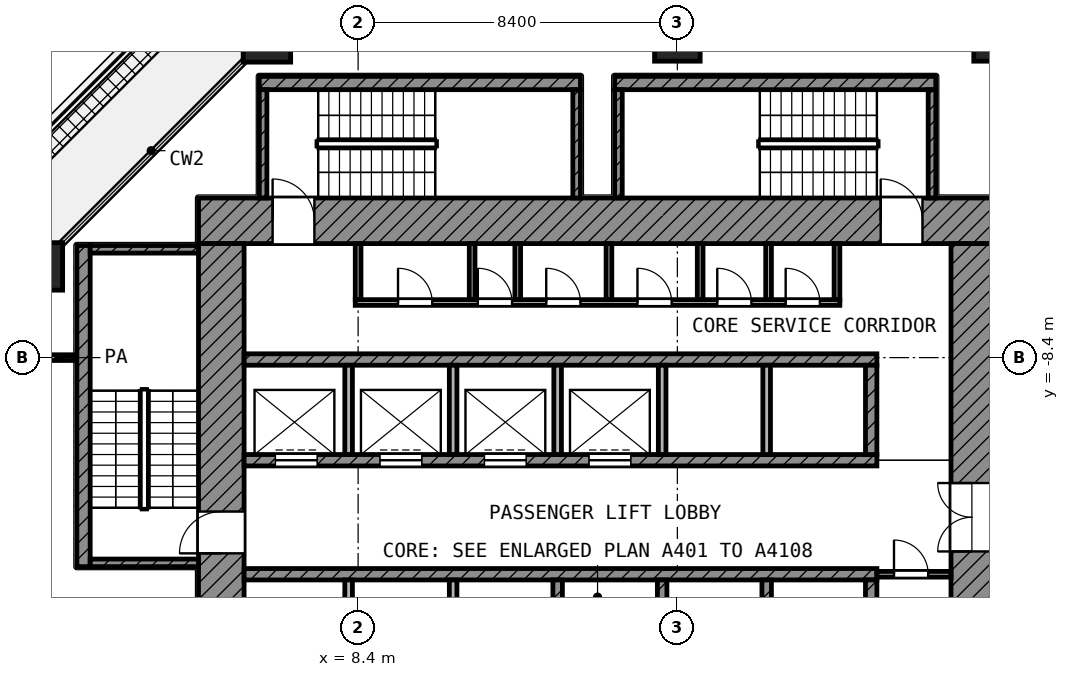
"""IFC4 building model, lengths in metres.
Left out: names, types, materials, properties, quantities, classifications, styles, units other than length and angle.
Written with IfcOpenShell. Run it as: python <this file> out.ifc"""

import sys

from ifc_helpers import new_model, si_unit, direction, frame, frame_2d, origin, origin_2d, place, context, subcontext, project, spatial, rectangle, extrude, element, fill, save


model = new_model("IFC4")
c1 = context("Model", 3, precision=1e-05, world=origin(), true_north=direction((0.0, 1.0)))
c2 = subcontext(c1, "Body", "Model", "MODEL_VIEW")
j1 = project(units=[si_unit("LENGTHUNIT", "METRE"), si_unit("PLANEANGLEUNIT", "RADIAN")], contexts=[c1])
p1 = place(None, origin())
s1 = spatial("IfcSite", under=j1, at=p1, CompositionType="ELEMENT")
p2 = place(p1, origin())
s2 = spatial("IfcBuilding", under=s1, at=p2, CompositionType="ELEMENT")
p3 = place(p2, frame((0.0, 0.0, 68.6)))
s3 = spatial("IfcBuildingStorey", under=s2, at=p3, CompositionType="ELEMENT", Elevation=68.6)
p4 = place(p3, frame((6.0, 0.0, 0.0), z_axis=(0.0, 0.0, 1.0), x_axis=(1.0, 0.0, 0.0)))
e1 = element("IfcColumn", 1, at=p4, inside=s3, PredefinedType="COLUMN", context=c2, shape_type="SweptSolid", body=[
    extrude(rectangle(XDim=1.25, YDim=1.25, at=origin_2d()), origin(), (0.0, 0.0, 1.0), 4.2),
])
for number, where, z_axis, x_axis in (
    (2, (16.8, 0.0, 0.0), (0.0, 0.0, 1.0), (1.0, 0.0, 0.0)),
    (3, (25.2, 0.0, 0.0), (0.0, 0.0, 1.0), (1.0, 0.0, 0.0)),
):
    element("IfcColumn", number, at=place(p3, frame(where, z_axis=z_axis, x_axis=x_axis)), inside=s3, PredefinedType="COLUMN", context=c2, shape_type="SweptSolid", body=[
        extrude(rectangle(XDim=1.2, YDim=1.2, at=origin_2d()), origin(), (0.0, 0.0, 1.0), 4.2),
    ])
p5 = place(p3, frame((0.0, -6.0, 0.0), z_axis=(0.0, 0.0, 1.0), x_axis=(1.0, 0.0, 0.0)))
e4 = element("IfcColumn", 4, at=p5, inside=s3, PredefinedType="COLUMN", context=c2, shape_type="SweptSolid", body=[
    extrude(rectangle(XDim=1.25, YDim=1.25, at=origin_2d()), origin(), (0.0, 0.0, 1.0), 4.2),
])
p6 = place(p3, frame((4.2, -4.8, 0.0), z_axis=(0.0, 0.0, 1.0), x_axis=(1.0, 0.0, 0.0)))
e5 = element("IfcWall", 5, at=p6, inside=s3, PredefinedType="SHEAR", context=c2, shape_type="SweptSolid", body=[
    extrude(rectangle(XDim=20.9, YDim=1.2, at=frame_2d((10.45, 0.0))), origin(), (0.0, 0.0, 1.0), 3.9),
])
p7 = place(p6, frame((1.95, 0.0, 0.0)))
e6 = element("IfcOpeningElement", 6, at=p7, cuts=e5, PredefinedType="OPENING", context=c2, shape_type="SweptSolid", body=[
    extrude(rectangle(XDim=1.1, YDim=2.1, at=frame_2d((0.55, 1.05))), frame((0.0, 0.61, 0.0), z_axis=(0.0, -1.0, 0.0), x_axis=(1.0, 0.0, 0.0)), (0.0, 0.0, 1.0), 1.22),
])
p8 = place(p6, frame((17.95, 0.0, 0.0)))
e7 = element("IfcOpeningElement", 7, at=p8, cuts=e5, PredefinedType="OPENING", context=c2, shape_type="SweptSolid", body=[
    extrude(rectangle(XDim=1.1, YDim=2.1, at=frame_2d((0.55, 1.05))), frame((0.0, 0.61, 0.0), z_axis=(0.0, -1.0, 0.0), x_axis=(1.0, 0.0, 0.0)), (0.0, 0.0, 1.0), 1.22),
])
p9 = place(p3, frame((4.8, -25.1, 0.0), z_axis=(0.0, 0.0, 1.0), x_axis=(0.0, 1.0, 0.0)))
e8 = element("IfcWall", 8, at=p9, inside=s3, PredefinedType="SHEAR", context=c2, shape_type="SweptSolid", body=[
    extrude(rectangle(XDim=19.7, YDim=1.2, at=frame_2d((9.85, 0.0))), origin(), (0.0, 0.0, 1.0), 3.9),
])
p10 = place(p9, frame((11.55, 0.0, 0.0)))
e9 = element("IfcOpeningElement", 9, at=p10, cuts=e8, PredefinedType="OPENING", context=c2, shape_type="SweptSolid", body=[
    extrude(rectangle(XDim=1.1, YDim=2.1, at=frame_2d((0.55, 1.05))), frame((0.0, 0.61, 0.0), z_axis=(0.0, -1.0, 0.0), x_axis=(1.0, 0.0, 0.0)), (0.0, 0.0, 1.0), 1.22),
])
p11 = place(p9, frame((2.25, 0.0, 0.0)))
e10 = element("IfcOpeningElement", 10, at=p11, cuts=e8, PredefinedType="OPENING", context=c2, shape_type="SweptSolid", body=[
    extrude(rectangle(XDim=1.1, YDim=2.1, at=frame_2d((0.55, 1.05))), frame((0.0, 0.61, 0.0), z_axis=(0.0, -1.0, 0.0), x_axis=(1.0, 0.0, 0.0)), (0.0, 0.0, 1.0), 1.22),
])
p12 = place(p3, frame((24.55, -24.0, 0.0), z_axis=(0.0, 0.0, 1.0), x_axis=(0.0, 1.0, 0.0)))
e11 = element("IfcWall", 11, at=p12, inside=s3, PredefinedType="SHEAR", context=c2, shape_type="SweptSolid", body=[
    extrude(rectangle(XDim=18.6, YDim=1.1, at=frame_2d((9.3, 0.0))), origin(), (0.0, 0.0, 1.0), 3.9),
])
p13 = place(p12, frame((10.5, 0.0, 0.0)))
e12 = element("IfcOpeningElement", 12, at=p13, cuts=e11, PredefinedType="OPENING", context=c2, shape_type="SweptSolid", body=[
    extrude(rectangle(XDim=1.8, YDim=2.1, at=frame_2d((0.9, 1.05))), frame((0.0, 0.56, 0.0), z_axis=(0.0, -1.0, 0.0), x_axis=(1.0, 0.0, 0.0)), (0.0, 0.0, 1.0), 1.12),
])
p14 = place(p3, frame((5.4, -8.45, 0.0), z_axis=(0.0, 0.0, 1.0), x_axis=(1.0, 0.0, 0.0)))
e13 = element("IfcWall", 13, at=p14, inside=s3, PredefinedType="SHEAR", context=c2, shape_type="SweptSolid", body=[
    extrude(rectangle(XDim=16.65, YDim=0.3, at=frame_2d((8.325, 0.0))), origin(), (0.0, 0.0, 1.0), 3.9),
])
p15 = place(p3, frame((5.4, -11.1, 0.0), z_axis=(0.0, 0.0, 1.0), x_axis=(1.0, 0.0, 0.0)))
e14 = element("IfcWall", 14, at=p15, inside=s3, PredefinedType="SHEAR", context=c2, shape_type="SweptSolid", body=[
    extrude(rectangle(XDim=16.65, YDim=0.3, at=frame_2d((8.325, 0.0))), origin(), (0.0, 0.0, 1.0), 3.9),
])
p16 = place(p15, frame((0.825, 0.0, 0.0)))
e15 = element("IfcOpeningElement", 15, at=p16, cuts=e14, PredefinedType="OPENING", context=c2, shape_type="SweptSolid", body=[
    extrude(rectangle(XDim=1.1, YDim=2.1, at=frame_2d((0.55, 1.05))), frame((0.0, 0.16, 0.0), z_axis=(0.0, -1.0, 0.0), x_axis=(1.0, 0.0, 0.0)), (0.0, 0.0, 1.0), 0.32),
])
p17 = place(p15, frame((3.575, 0.0, 0.0)))
e16 = element("IfcOpeningElement", 16, at=p17, cuts=e14, PredefinedType="OPENING", context=c2, shape_type="SweptSolid", body=[
    extrude(rectangle(XDim=1.1, YDim=2.1, at=frame_2d((0.55, 1.05))), frame((0.0, 0.16, 0.0), z_axis=(0.0, -1.0, 0.0), x_axis=(1.0, 0.0, 0.0)), (0.0, 0.0, 1.0), 0.32),
])
p18 = place(p15, frame((6.325, 0.0, 0.0)))
e17 = element("IfcOpeningElement", 17, at=p18, cuts=e14, PredefinedType="OPENING", context=c2, shape_type="SweptSolid", body=[
    extrude(rectangle(XDim=1.1, YDim=2.1, at=frame_2d((0.55, 1.05))), frame((0.0, 0.16, 0.0), z_axis=(0.0, -1.0, 0.0), x_axis=(1.0, 0.0, 0.0)), (0.0, 0.0, 1.0), 0.32),
])
p19 = place(p15, frame((9.075, 0.0, 0.0)))
e18 = element("IfcOpeningElement", 18, at=p19, cuts=e14, PredefinedType="OPENING", context=c2, shape_type="SweptSolid", body=[
    extrude(rectangle(XDim=1.1, YDim=2.1, at=frame_2d((0.55, 1.05))), frame((0.0, 0.16, 0.0), z_axis=(0.0, -1.0, 0.0), x_axis=(1.0, 0.0, 0.0)), (0.0, 0.0, 1.0), 0.32),
])
p20 = place(p3, frame((5.4, -14.1, 0.0), z_axis=(0.0, 0.0, 1.0), x_axis=(1.0, 0.0, 0.0)))
e19 = element("IfcWall", 19, at=p20, inside=s3, PredefinedType="SHEAR", context=c2, shape_type="SweptSolid", body=[
    extrude(rectangle(XDim=16.65, YDim=0.3, at=frame_2d((8.325, 0.0))), origin(), (0.0, 0.0, 1.0), 3.9),
])
p21 = place(p3, frame((21.9, -10.95, 0.0), z_axis=(0.0, 0.0, 1.0), x_axis=(0.0, 1.0, 0.0)))
e20 = element("IfcWall", 20, at=p21, inside=s3, PredefinedType="SHEAR", context=c2, shape_type="SweptSolid", body=[
    extrude(rectangle(XDim=2.35, YDim=0.3, at=frame_2d((1.175, 0.0))), origin(), (0.0, 0.0, 1.0), 3.9),
])
p22 = place(p3, frame((21.9, -16.6, 0.0), z_axis=(0.0, 0.0, 1.0), x_axis=(0.0, 1.0, 0.0)))
e21 = element("IfcWall", 21, at=p22, inside=s3, PredefinedType="SHEAR", context=c2, shape_type="SweptSolid", body=[
    extrude(rectangle(XDim=2.35, YDim=0.3, at=frame_2d((1.175, 0.0))), origin(), (0.0, 0.0, 1.0), 3.9),
])
for number, where, z_axis, x_axis in (
    (22, (8.15, -10.95, 0.0), (0.0, 0.0, 1.0), (0.0, 1.0, 0.0)),
    (23, (10.9, -10.95, 0.0), (0.0, 0.0, 1.0), (0.0, 1.0, 0.0)),
    (24, (13.65, -10.95, 0.0), (0.0, 0.0, 1.0), (0.0, 1.0, 0.0)),
    (25, (16.4, -10.95, 0.0), (0.0, 0.0, 1.0), (0.0, 1.0, 0.0)),
    (26, (19.15, -10.95, 0.0), (0.0, 0.0, 1.0), (0.0, 1.0, 0.0)),
):
    element("IfcWall", number, at=place(p3, frame(where, z_axis=z_axis, x_axis=x_axis)), inside=s3, PredefinedType="PARTITIONING", context=c2, shape_type="SweptSolid", body=[
        extrude(rectangle(XDim=2.35, YDim=0.2, at=frame_2d((1.175, 0.0))), origin(), (0.0, 0.0, 1.0), 3.9),
    ])
for number, where, z_axis, x_axis in (
    (27, (8.15, -16.6, 0.0), (0.0, 0.0, 1.0), (0.0, 1.0, 0.0)),
    (28, (10.9, -16.6, 0.0), (0.0, 0.0, 1.0), (0.0, 1.0, 0.0)),
):
    element("IfcWall", number, at=place(p3, frame(where, z_axis=z_axis, x_axis=x_axis)), inside=s3, PredefinedType="PARTITIONING", context=c2, shape_type="SweptSolid", body=[
        extrude(rectangle(XDim=2.35, YDim=0.2, at=frame_2d((1.175, 0.0))), origin(), (0.0, 0.0, 1.0), 3.9),
    ])
for number, where, z_axis, x_axis in (
    (29, (13.65, -16.6, 0.0), (0.0, 0.0, 1.0), (0.0, 1.0, 0.0)),
    (30, (16.4, -16.6, 0.0), (0.0, 0.0, 1.0), (0.0, 1.0, 0.0)),
    (31, (19.15, -16.6, 0.0), (0.0, 0.0, 1.0), (0.0, 1.0, 0.0)),
):
    element("IfcWall", number, at=place(p3, frame(where, z_axis=z_axis, x_axis=x_axis)), inside=s3, PredefinedType="SHEAR", context=c2, shape_type="SweptSolid", body=[
        extrude(rectangle(XDim=2.35, YDim=0.25, at=frame_2d((1.175, 0.0))), origin(), (0.0, 0.0, 1.0), 3.9),
    ])
p23 = place(p3, frame((22.05, -14.1, 0.0), z_axis=(0.0, 0.0, 1.0), x_axis=(1.0, 0.0, 0.0)))
e32 = element("IfcWall", 32, at=p23, inside=s3, PredefinedType="PARTITIONING", context=c2, shape_type="SweptSolid", body=[
    extrude(rectangle(XDim=1.95, YDim=0.15, at=frame_2d((0.975, 0.0))), origin(), (0.0, 0.0, 1.0), 3.9),
])
p24 = place(p23, frame((0.45, 0.0, 0.0)))
e33 = element("IfcOpeningElement", 33, at=p24, cuts=e32, PredefinedType="OPENING", context=c2, shape_type="SweptSolid", body=[
    extrude(rectangle(XDim=0.9, YDim=2.1, at=frame_2d((0.45, 1.05))), frame((0.0, 0.085, 0.0), z_axis=(0.0, -1.0, 0.0), x_axis=(1.0, 0.0, 0.0)), (0.0, 0.0, 1.0), 0.17),
])
p25 = place(p3, frame((8.325, -6.95, 0.0), z_axis=(0.0, 0.0, 1.0), x_axis=(1.0, 0.0, 0.0)))
e34 = element("IfcWall", 34, at=p25, inside=s3, PredefinedType="PARTITIONING", context=c2, shape_type="SweptSolid", body=[
    extrude(rectangle(XDim=12.75, YDim=0.15, at=frame_2d((6.375, 0.0))), origin(), (0.0, 0.0, 1.0), 3.9),
])
p26 = place(p25, frame((1.125, 0.0, 0.0)))
e35 = element("IfcOpeningElement", 35, at=p26, cuts=e34, PredefinedType="OPENING", context=c2, shape_type="SweptSolid", body=[
    extrude(rectangle(XDim=0.9, YDim=2.1, at=frame_2d((0.45, 1.05))), frame((0.0, 0.085, 0.0), z_axis=(0.0, -1.0, 0.0), x_axis=(1.0, 0.0, 0.0)), (0.0, 0.0, 1.0), 0.17),
])
p27 = place(p25, frame((3.225, 0.0, 0.0)))
e36 = element("IfcOpeningElement", 36, at=p27, cuts=e34, PredefinedType="OPENING", context=c2, shape_type="SweptSolid", body=[
    extrude(rectangle(XDim=0.9, YDim=2.1, at=frame_2d((0.45, 1.05))), frame((0.0, 0.085, 0.0), z_axis=(0.0, -1.0, 0.0), x_axis=(1.0, 0.0, 0.0)), (0.0, 0.0, 1.0), 0.17),
])
p28 = place(p25, frame((5.025, 0.0, 0.0)))
e37 = element("IfcOpeningElement", 37, at=p28, cuts=e34, PredefinedType="OPENING", context=c2, shape_type="SweptSolid", body=[
    extrude(rectangle(XDim=0.9, YDim=2.1, at=frame_2d((0.45, 1.05))), frame((0.0, 0.085, 0.0), z_axis=(0.0, -1.0, 0.0), x_axis=(1.0, 0.0, 0.0)), (0.0, 0.0, 1.0), 0.17),
])
p29 = place(p25, frame((7.425, 0.0, 0.0)))
e38 = element("IfcOpeningElement", 38, at=p29, cuts=e34, PredefinedType="OPENING", context=c2, shape_type="SweptSolid", body=[
    extrude(rectangle(XDim=0.9, YDim=2.1, at=frame_2d((0.45, 1.05))), frame((0.0, 0.085, 0.0), z_axis=(0.0, -1.0, 0.0), x_axis=(1.0, 0.0, 0.0)), (0.0, 0.0, 1.0), 0.17),
])
p30 = place(p25, frame((9.525, 0.0, 0.0)))
e39 = element("IfcOpeningElement", 39, at=p30, cuts=e34, PredefinedType="OPENING", context=c2, shape_type="SweptSolid", body=[
    extrude(rectangle(XDim=0.9, YDim=2.1, at=frame_2d((0.45, 1.05))), frame((0.0, 0.085, 0.0), z_axis=(0.0, -1.0, 0.0), x_axis=(1.0, 0.0, 0.0)), (0.0, 0.0, 1.0), 0.17),
])
p31 = place(p25, frame((11.325, 0.0, 0.0)))
e40 = element("IfcOpeningElement", 40, at=p31, cuts=e34, PredefinedType="OPENING", context=c2, shape_type="SweptSolid", body=[
    extrude(rectangle(XDim=0.9, YDim=2.1, at=frame_2d((0.45, 1.05))), frame((0.0, 0.085, 0.0), z_axis=(0.0, -1.0, 0.0), x_axis=(1.0, 0.0, 0.0)), (0.0, 0.0, 1.0), 0.17),
])
for number, where, z_axis, x_axis in (
    (41, (8.4, -6.875, 0.0), (0.0, 0.0, 1.0), (0.0, 1.0, 0.0)),
    (42, (11.4, -6.875, 0.0), (0.0, 0.0, 1.0), (0.0, 1.0, 0.0)),
    (43, (12.6, -6.875, 0.0), (0.0, 0.0, 1.0), (0.0, 1.0, 0.0)),
    (44, (15.0, -6.875, 0.0), (0.0, 0.0, 1.0), (0.0, 1.0, 0.0)),
    (45, (17.4, -6.875, 0.0), (0.0, 0.0, 1.0), (0.0, 1.0, 0.0)),
    (46, (19.2, -6.875, 0.0), (0.0, 0.0, 1.0), (0.0, 1.0, 0.0)),
    (47, (21.0, -6.875, 0.0), (0.0, 0.0, 1.0), (0.0, 1.0, 0.0)),
):
    element("IfcWall", number, at=place(p3, frame(where, z_axis=z_axis, x_axis=x_axis)), inside=s3, PredefinedType="PARTITIONING", context=c2, shape_type="SweptSolid", body=[
        extrude(rectangle(XDim=1.475, YDim=0.15, at=frame_2d((0.738, 0.0))), origin(), (0.0, 0.0, 1.0), 3.9),
    ])
p32 = place(p3, frame((1.175, -13.9, 0.0), z_axis=(0.0, 0.0, 1.0), x_axis=(0.0, 1.0, 0.0)))
e48 = element("IfcWall", 48, at=p32, inside=s3, PredefinedType="SHEAR", context=c2, shape_type="SweptSolid", body=[
    extrude(rectangle(XDim=8.45, YDim=0.35, at=frame_2d((4.225, 0.0))), origin(), (0.0, 0.0, 1.0), 3.9),
])
for number, where, z_axis, x_axis in (
    (49, (1.35, -5.55, 0.0), (0.0, 0.0, 1.0), (1.0, 0.0, 0.0)),
    (50, (1.35, -13.8, 0.0), (0.0, 0.0, 1.0), (1.0, 0.0, 0.0)),
):
    element("IfcWall", number, at=place(p3, frame(where, z_axis=z_axis, x_axis=x_axis)), inside=s3, PredefinedType="SHEAR", context=c2, shape_type="SweptSolid", body=[
        extrude(rectangle(XDim=2.85, YDim=0.2, at=frame_2d((1.425, 0.0))), origin(), (0.0, 0.0, 1.0), 3.9),
    ])
p33 = place(p3, frame((5.8, -1.175, 0.0), z_axis=(0.0, 0.0, 1.0), x_axis=(1.0, 0.0, 0.0)))
e51 = element("IfcWall", 51, at=p33, inside=s3, PredefinedType="SHEAR", context=c2, shape_type="SweptSolid", body=[
    extrude(rectangle(XDim=8.45, YDim=0.35, at=frame_2d((4.225, 0.0))), origin(), (0.0, 0.0, 1.0), 3.9),
])
for number, where, z_axis, x_axis in (
    (52, (5.9, -4.2, 0.0), (0.0, 0.0, 1.0), (0.0, 1.0, 0.0)),
    (53, (14.15, -4.2, 0.0), (0.0, 0.0, 1.0), (0.0, 1.0, 0.0)),
):
    element("IfcWall", number, at=place(p3, frame(where, z_axis=z_axis, x_axis=x_axis)), inside=s3, PredefinedType="SHEAR", context=c2, shape_type="SweptSolid", body=[
        extrude(rectangle(XDim=2.85, YDim=0.2, at=frame_2d((1.425, 0.0))), origin(), (0.0, 0.0, 1.0), 3.9),
    ])
p34 = place(p3, frame((15.15, -1.175, 0.0), z_axis=(0.0, 0.0, 1.0), x_axis=(1.0, 0.0, 0.0)))
e54 = element("IfcWall", 54, at=p34, inside=s3, PredefinedType="SHEAR", context=c2, shape_type="SweptSolid", body=[
    extrude(rectangle(XDim=8.45, YDim=0.35, at=frame_2d((4.225, 0.0))), origin(), (0.0, 0.0, 1.0), 3.9),
])
for number, where, z_axis, x_axis in (
    (55, (15.25, -4.2, 0.0), (0.0, 0.0, 1.0), (0.0, 1.0, 0.0)),
    (56, (23.5, -4.2, 0.0), (0.0, 0.0, 1.0), (0.0, 1.0, 0.0)),
):
    element("IfcWall", number, at=place(p3, frame(where, z_axis=z_axis, x_axis=x_axis)), inside=s3, PredefinedType="SHEAR", context=c2, shape_type="SweptSolid", body=[
        extrude(rectangle(XDim=2.85, YDim=0.2, at=frame_2d((1.425, 0.0))), origin(), (0.0, 0.0, 1.0), 3.9),
    ])
p35 = place(p3, frame((0.08, -8.4, 0.0), z_axis=(0.0, 0.0, 1.0), x_axis=(1.0, 0.0, 0.0)))
e57 = element("IfcWall", 57, at=p35, inside=s3, PredefinedType="PARTITIONING", context=c2, shape_type="SweptSolid", body=[
    extrude(rectangle(XDim=0.89, YDim=0.15, at=frame_2d((0.445, 0.0))), origin(), (0.0, 0.0, 1.0), 3.9),
])
p36 = place(p16, origin())
e58 = element("IfcDoor", 58, at=p36, inside=s3, OperationType="DOUBLE_DOOR_SLIDING", PredefinedType="DOOR", context=c2, shape_type="SweptSolid", body=[
    extrude(rectangle(XDim=1.1, YDim=2.1, at=frame_2d((0.55, 1.05))), frame((0.0, 0.025, 0.0), z_axis=(0.0, -1.0, 0.0), x_axis=(1.0, 0.0, 0.0)), (0.0, 0.0, 1.0), 0.05),
])
fill(e15, e58)
p37 = place(p17, origin())
e59 = element("IfcDoor", 59, at=p37, inside=s3, OperationType="DOUBLE_DOOR_SLIDING", PredefinedType="DOOR", context=c2, shape_type="SweptSolid", body=[
    extrude(rectangle(XDim=1.1, YDim=2.1, at=frame_2d((0.55, 1.05))), frame((0.0, 0.025, 0.0), z_axis=(0.0, -1.0, 0.0), x_axis=(1.0, 0.0, 0.0)), (0.0, 0.0, 1.0), 0.05),
])
fill(e16, e59)
p38 = place(p18, origin())
e60 = element("IfcDoor", 60, at=p38, inside=s3, OperationType="DOUBLE_DOOR_SLIDING", PredefinedType="DOOR", context=c2, shape_type="SweptSolid", body=[
    extrude(rectangle(XDim=1.1, YDim=2.1, at=frame_2d((0.55, 1.05))), frame((0.0, 0.025, 0.0), z_axis=(0.0, -1.0, 0.0), x_axis=(1.0, 0.0, 0.0)), (0.0, 0.0, 1.0), 0.05),
])
fill(e17, e60)
p39 = place(p19, origin())
e61 = element("IfcDoor", 61, at=p39, inside=s3, OperationType="DOUBLE_DOOR_SLIDING", PredefinedType="DOOR", context=c2, shape_type="SweptSolid", body=[
    extrude(rectangle(XDim=1.1, YDim=2.1, at=frame_2d((0.55, 1.05))), frame((0.0, 0.025, 0.0), z_axis=(0.0, -1.0, 0.0), x_axis=(1.0, 0.0, 0.0)), (0.0, 0.0, 1.0), 0.05),
])
fill(e18, e61)
p40 = place(p10, origin())
e62 = element("IfcDoor", 62, at=p40, inside=s3, OperationType="SINGLE_SWING_LEFT", PredefinedType="DOOR", context=c2, shape_type="SweptSolid", body=[
    extrude(rectangle(XDim=1.1, YDim=2.1, at=frame_2d((0.55, 1.05))), frame((0.0, 0.025, 0.0), z_axis=(0.0, -1.0, 0.0), x_axis=(1.0, 0.0, 0.0)), (0.0, 0.0, 1.0), 0.05),
])
fill(e9, e62)
p41 = place(p7, origin())
e63 = element("IfcDoor", 63, at=p41, inside=s3, OperationType="SINGLE_SWING_LEFT", PredefinedType="DOOR", context=c2, shape_type="SweptSolid", body=[
    extrude(rectangle(XDim=1.1, YDim=2.1, at=frame_2d((0.55, 1.05))), frame((0.0, 0.025, 0.0), z_axis=(0.0, -1.0, 0.0), x_axis=(1.0, 0.0, 0.0)), (0.0, 0.0, 1.0), 0.05),
])
fill(e6, e63)
p42 = place(p8, origin())
e64 = element("IfcDoor", 64, at=p42, inside=s3, OperationType="SINGLE_SWING_LEFT", PredefinedType="DOOR", context=c2, shape_type="SweptSolid", body=[
    extrude(rectangle(XDim=1.1, YDim=2.1, at=frame_2d((0.55, 1.05))), frame((0.0, 0.025, 0.0), z_axis=(0.0, -1.0, 0.0), x_axis=(1.0, 0.0, 0.0)), (0.0, 0.0, 1.0), 0.05),
])
fill(e7, e64)
p43 = place(p13, origin())
e65 = element("IfcDoor", 65, at=p43, inside=s3, OperationType="DOUBLE_DOOR_SINGLE_SWING", PredefinedType="DOOR", context=c2, shape_type="SweptSolid", body=[
    extrude(rectangle(XDim=1.8, YDim=2.1, at=frame_2d((0.9, 1.05))), frame((0.0, 0.025, 0.0), z_axis=(0.0, -1.0, 0.0), x_axis=(1.0, 0.0, 0.0)), (0.0, 0.0, 1.0), 0.05),
])
fill(e12, e65)
p44 = place(p26, origin())
e66 = element("IfcDoor", 66, at=p44, inside=s3, OperationType="SINGLE_SWING_LEFT", PredefinedType="DOOR", context=c2, shape_type="SweptSolid", body=[
    extrude(rectangle(XDim=0.9, YDim=2.1, at=frame_2d((0.45, 1.05))), frame((0.0, 0.025, 0.0), z_axis=(0.0, -1.0, 0.0), x_axis=(1.0, 0.0, 0.0)), (0.0, 0.0, 1.0), 0.05),
])
fill(e35, e66)
p45 = place(p27, origin())
e67 = element("IfcDoor", 67, at=p45, inside=s3, OperationType="SINGLE_SWING_LEFT", PredefinedType="DOOR", context=c2, shape_type="SweptSolid", body=[
    extrude(rectangle(XDim=0.9, YDim=2.1, at=frame_2d((0.45, 1.05))), frame((0.0, 0.025, 0.0), z_axis=(0.0, -1.0, 0.0), x_axis=(1.0, 0.0, 0.0)), (0.0, 0.0, 1.0), 0.05),
])
fill(e36, e67)
p46 = place(p28, origin())
e68 = element("IfcDoor", 68, at=p46, inside=s3, OperationType="SINGLE_SWING_LEFT", PredefinedType="DOOR", context=c2, shape_type="SweptSolid", body=[
    extrude(rectangle(XDim=0.9, YDim=2.1, at=frame_2d((0.45, 1.05))), frame((0.0, 0.025, 0.0), z_axis=(0.0, -1.0, 0.0), x_axis=(1.0, 0.0, 0.0)), (0.0, 0.0, 1.0), 0.05),
])
fill(e37, e68)
p47 = place(p29, origin())
e69 = element("IfcDoor", 69, at=p47, inside=s3, OperationType="SINGLE_SWING_LEFT", PredefinedType="DOOR", context=c2, shape_type="SweptSolid", body=[
    extrude(rectangle(XDim=0.9, YDim=2.1, at=frame_2d((0.45, 1.05))), frame((0.0, 0.025, 0.0), z_axis=(0.0, -1.0, 0.0), x_axis=(1.0, 0.0, 0.0)), (0.0, 0.0, 1.0), 0.05),
])
fill(e38, e69)
p48 = place(p30, origin())
e70 = element("IfcDoor", 70, at=p48, inside=s3, OperationType="SINGLE_SWING_LEFT", PredefinedType="DOOR", context=c2, shape_type="SweptSolid", body=[
    extrude(rectangle(XDim=0.9, YDim=2.1, at=frame_2d((0.45, 1.05))), frame((0.0, 0.025, 0.0), z_axis=(0.0, -1.0, 0.0), x_axis=(1.0, 0.0, 0.0)), (0.0, 0.0, 1.0), 0.05),
])
fill(e39, e70)
p49 = place(p31, origin())
e71 = element("IfcDoor", 71, at=p49, inside=s3, OperationType="SINGLE_SWING_LEFT", PredefinedType="DOOR", context=c2, shape_type="SweptSolid", body=[
    extrude(rectangle(XDim=0.9, YDim=2.1, at=frame_2d((0.45, 1.05))), frame((0.0, 0.025, 0.0), z_axis=(0.0, -1.0, 0.0), x_axis=(1.0, 0.0, 0.0)), (0.0, 0.0, 1.0), 0.05),
])
fill(e40, e71)
p50 = place(p24, origin())
e72 = element("IfcDoor", 72, at=p50, inside=s3, OperationType="SINGLE_SWING_LEFT", PredefinedType="DOOR", context=c2, shape_type="SweptSolid", body=[
    extrude(rectangle(XDim=0.9, YDim=2.1, at=frame_2d((0.45, 1.05))), frame((0.0, 0.025, 0.0), z_axis=(0.0, -1.0, 0.0), x_axis=(1.0, 0.0, 0.0)), (0.0, 0.0, 1.0), 0.05),
])
fill(e33, e72)
save(model, sys.argv[1])
